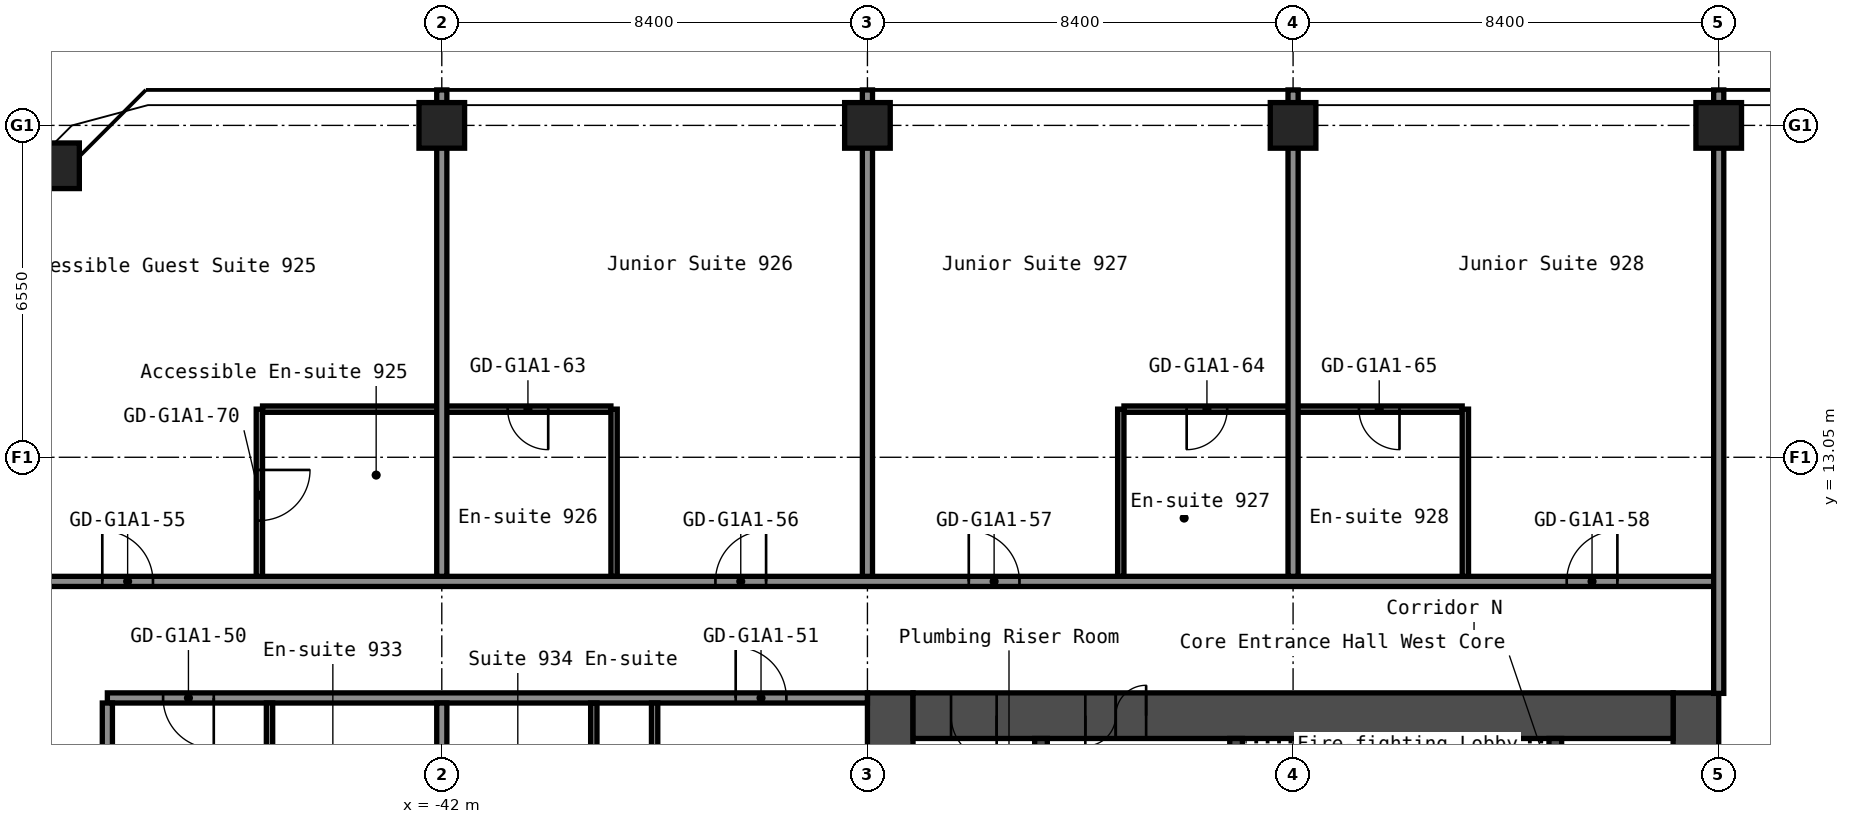
"""IFC4 building model, lengths in metres.
Left out: names, types, materials, properties, quantities, classifications, styles, units other than length and angle.
Written with IfcOpenShell. Run it as: python <this file> out.ifc"""

import sys

from ifc_helpers import new_model, si_unit, direction, frame, frame_2d, origin, origin_2d, place, context, subcontext, project, spatial, rectangle, hollow_rectangle, extrude, element, fill, save


model = new_model("IFC4")
c1 = context("Model", 3, precision=1e-05, world=origin(), true_north=direction((0.0, 1.0)))
c2 = subcontext(c1, "Body", "Model", "MODEL_VIEW")
j1 = project(units=[si_unit("LENGTHUNIT", "METRE"), si_unit("PLANEANGLEUNIT", "RADIAN")], contexts=[c1])
p1 = place(None, origin())
s1 = spatial("IfcSite", under=j1, at=p1, CompositionType="ELEMENT")
p2 = place(p1, origin())
s2 = spatial("IfcBuilding", under=s1, at=p2, CompositionType="ELEMENT")
p3 = place(p2, frame((0.0, 0.0, 35.8)))
s3 = spatial("IfcBuildingStorey", under=s2, at=p3, CompositionType="ELEMENT", Elevation=35.8)
for number, where, z_axis, x_axis in (
    (1, (-49.603, 18.803, 0.0), (0.0, 0.0, 1.0), (1.0, 0.0, 0.0)),
    (2, (-42.0, 19.6, 0.0), (0.0, 0.0, 1.0), (1.0, 0.0, 0.0)),
    (3, (-33.6, 19.6, 0.0), (0.0, 0.0, 1.0), (1.0, 0.0, 0.0)),
    (4, (-25.2, 19.6, 0.0), (0.0, 0.0, 1.0), (1.0, 0.0, 0.0)),
    (5, (-16.8, 19.6, 0.0), (0.0, 0.0, 1.0), (1.0, 0.0, 0.0)),
):
    element("IfcColumn", number, at=place(p3, frame(where, z_axis=z_axis, x_axis=x_axis)), inside=s3, PredefinedType="COLUMN", context=c2, shape_type="SweptSolid", body=[
        extrude(hollow_rectangle(XDim=0.9, YDim=0.9, WallThickness=0.036, at=origin_2d()), origin(), (0.0, 0.0, 1.0), 2.8),
    ])
p4 = place(p3, frame((-17.25, -8.4, 0.0), z_axis=(0.0, 0.0, 1.0), x_axis=(0.0, 1.0, 0.0)))
e6 = element("IfcWall", 6, at=p4, inside=s3, PredefinedType="SHEAR", context=c2, shape_type="SweptSolid", body=[
    extrude(rectangle(XDim=16.8, YDim=0.9, at=frame_2d((8.4, 0.0))), origin(), (0.0, 0.0, 1.0), 2.8),
])
p5 = place(p4, frame((12.75, 0.0, 0.0)))
e7 = element("IfcOpeningElement", 7, at=p5, cuts=e6, PredefinedType="OPENING", context=c2, shape_type="SweptSolid", body=[
    extrude(rectangle(XDim=1.2, YDim=2.1, at=frame_2d((0.6, 1.05))), frame((0.0, 0.46, 0.0), z_axis=(0.0, -1.0, 0.0), x_axis=(1.0, 0.0, 0.0)), (0.0, 0.0, 1.0), 0.92),
])
p6 = place(p4, frame((2.85, 0.0, 0.0)))
e8 = element("IfcOpeningElement", 8, at=p6, cuts=e6, PredefinedType="OPENING", context=c2, shape_type="SweptSolid", body=[
    extrude(rectangle(XDim=1.2, YDim=2.1, at=frame_2d((0.6, 1.05))), frame((0.0, 0.46, 0.0), z_axis=(0.0, -1.0, 0.0), x_axis=(1.0, 0.0, 0.0)), (0.0, 0.0, 1.0), 0.92),
])
p7 = place(p3, frame((-33.15, -8.4, 0.0), z_axis=(0.0, 0.0, 1.0), x_axis=(0.0, 1.0, 0.0)))
e9 = element("IfcWall", 9, at=p7, inside=s3, PredefinedType="SHEAR", context=c2, shape_type="SweptSolid", body=[
    extrude(rectangle(XDim=16.8, YDim=0.9, at=frame_2d((8.4, 0.0))), origin(), (0.0, 0.0, 1.0), 2.8),
])
p8 = place(p3, frame((-32.7, 7.95, 0.0), z_axis=(0.0, 0.0, 1.0), x_axis=(1.0, 0.0, 0.0)))
e10 = element("IfcWall", 10, at=p8, inside=s3, PredefinedType="SHEAR", context=c2, shape_type="SweptSolid", body=[
    extrude(rectangle(XDim=15.0, YDim=0.9, at=frame_2d((7.5, 0.0))), origin(), (0.0, 0.0, 1.0), 2.8),
])
p9 = place(p8, frame((3.4, 0.0, 0.0)))
e11 = element("IfcOpeningElement", 11, at=p9, cuts=e10, PredefinedType="OPENING", context=c2, shape_type="SweptSolid", body=[
    extrude(rectangle(XDim=1.2, YDim=2.1, at=frame_2d((0.6, 1.05))), frame((0.0, 0.46, 0.0), z_axis=(0.0, -1.0, 0.0), x_axis=(1.0, 0.0, 0.0)), (0.0, 0.0, 1.0), 0.92),
])
p10 = place(p8, frame((0.75, 0.0, 0.0)))
e12 = element("IfcOpeningElement", 12, at=p10, cuts=e10, PredefinedType="OPENING", context=c2, shape_type="SweptSolid", body=[
    extrude(rectangle(XDim=0.9, YDim=2.1, at=frame_2d((0.45, 1.05))), frame((0.0, 0.46, 0.0), z_axis=(0.0, -1.0, 0.0), x_axis=(1.0, 0.0, 0.0)), (0.0, 0.0, 1.0), 0.92),
])
p11 = place(p3, frame((-20.025, 1.2, 0.0), z_axis=(0.0, 0.0, 1.0), x_axis=(0.0, 1.0, 0.0)))
e13 = element("IfcWall", 13, at=p11, inside=s3, PredefinedType="SHEAR", context=c2, shape_type="SweptSolid", body=[
    extrude(rectangle(XDim=6.3, YDim=0.25, at=frame_2d((3.15, 0.0))), origin(), (0.0, 0.0, 1.0), 2.8),
])
p12 = place(p3, frame((-26.325, 3.75, 0.0), z_axis=(0.0, 0.0, 1.0), x_axis=(0.0, 1.0, 0.0)))
e14 = element("IfcWall", 14, at=p12, inside=s3, PredefinedType="SHEAR", context=c2, shape_type="SweptSolid", body=[
    extrude(rectangle(XDim=3.75, YDim=0.25, at=frame_2d((1.875, 0.0))), origin(), (0.0, 0.0, 1.0), 2.8),
])
p13 = place(p12, frame((1.25, 0.0, 0.0)))
e15 = element("IfcOpeningElement", 15, at=p13, cuts=e14, PredefinedType="OPENING", context=c2, shape_type="SweptSolid", body=[
    extrude(rectangle(XDim=1.2, YDim=2.1, at=frame_2d((0.6, 1.05))), frame((0.0, 0.135, 0.0), z_axis=(0.0, -1.0, 0.0), x_axis=(1.0, 0.0, 0.0)), (0.0, 0.0, 1.0), 0.27),
])
p14 = place(p3, frame((-30.175, 1.45, 0.0), z_axis=(0.0, 0.0, 1.0), x_axis=(0.0, 1.0, 0.0)))
e16 = element("IfcWall", 16, at=p14, inside=s3, PredefinedType="SHEAR", context=c2, shape_type="SweptSolid", body=[
    extrude(rectangle(XDim=6.05, YDim=0.25, at=frame_2d((3.025, 0.0))), origin(), (0.0, 0.0, 1.0), 2.8),
])
p15 = place(p14, frame((2.625, 0.0, 0.0)))
e17 = element("IfcOpeningElement", 17, at=p15, cuts=e16, PredefinedType="OPENING", context=c2, shape_type="SweptSolid", body=[
    extrude(rectangle(XDim=1.1, YDim=2.1, at=frame_2d((0.55, 1.05))), frame((0.0, 0.135, 0.0), z_axis=(0.0, -1.0, 0.0), x_axis=(1.0, 0.0, 0.0)), (0.0, 0.0, 1.0), 0.27),
])
p16 = place(p3, frame((-48.6, 8.3, 0.0), z_axis=(0.0, 0.0, 1.0), x_axis=(1.0, 0.0, 0.0)))
e18 = element("IfcWall", 18, at=p16, inside=s3, PredefinedType="PARTITIONING", context=c2, shape_type="SweptSolid", body=[
    extrude(rectangle(XDim=15.0, YDim=0.2, at=frame_2d((7.5, 0.0))), origin(), (0.0, 0.0, 1.0), 2.8),
])
p17 = place(p16, frame((1.1, 0.0, 0.0)))
e19 = element("IfcOpeningElement", 19, at=p17, cuts=e18, PredefinedType="OPENING", context=c2, shape_type="SweptSolid", body=[
    extrude(rectangle(XDim=1.0, YDim=2.1, at=frame_2d((0.5, 1.05))), frame((0.0, 0.11, 0.0), z_axis=(0.0, -1.0, 0.0), x_axis=(1.0, 0.0, 0.0)), (0.0, 0.0, 1.0), 0.22),
])
p18 = place(p16, frame((12.4, 0.0, 0.0)))
e20 = element("IfcOpeningElement", 20, at=p18, cuts=e18, PredefinedType="OPENING", context=c2, shape_type="SweptSolid", body=[
    extrude(rectangle(XDim=1.0, YDim=2.1, at=frame_2d((0.5, 1.05))), frame((0.0, 0.11, 0.0), z_axis=(0.0, -1.0, 0.0), x_axis=(1.0, 0.0, 0.0)), (0.0, 0.0, 1.0), 0.22),
])
p19 = place(p3, frame((-51.1, 10.6, 0.0), z_axis=(0.0, 0.0, 1.0), x_axis=(1.0, 0.0, 0.0)))
e21 = element("IfcWall", 21, at=p19, inside=s3, PredefinedType="PARTITIONING", context=c2, shape_type="SweptSolid", body=[
    extrude(rectangle(XDim=34.3, YDim=0.2, at=frame_2d((17.15, 0.0))), origin(), (0.0, 0.0, 1.0), 2.8),
])
p20 = place(p19, frame((2.4, 0.0, 0.0)))
e22 = element("IfcOpeningElement", 22, at=p20, cuts=e21, PredefinedType="OPENING", context=c2, shape_type="SweptSolid", body=[
    extrude(rectangle(XDim=1.0, YDim=2.1, at=frame_2d((0.5, 1.05))), frame((0.0, 0.11, 0.0), z_axis=(0.0, -1.0, 0.0), x_axis=(1.0, 0.0, 0.0)), (0.0, 0.0, 1.0), 0.22),
])
p21 = place(p19, frame((14.5, 0.0, 0.0)))
e23 = element("IfcOpeningElement", 23, at=p21, cuts=e21, PredefinedType="OPENING", context=c2, shape_type="SweptSolid", body=[
    extrude(rectangle(XDim=1.0, YDim=2.1, at=frame_2d((0.5, 1.05))), frame((0.0, 0.11, 0.0), z_axis=(0.0, -1.0, 0.0), x_axis=(1.0, 0.0, 0.0)), (0.0, 0.0, 1.0), 0.22),
])
p22 = place(p19, frame((19.5, 0.0, 0.0)))
e24 = element("IfcOpeningElement", 24, at=p22, cuts=e21, PredefinedType="OPENING", context=c2, shape_type="SweptSolid", body=[
    extrude(rectangle(XDim=1.0, YDim=2.1, at=frame_2d((0.5, 1.05))), frame((0.0, 0.11, 0.0), z_axis=(0.0, -1.0, 0.0), x_axis=(1.0, 0.0, 0.0)), (0.0, 0.0, 1.0), 0.22),
])
p23 = place(p19, frame((31.3, 0.0, 0.0)))
e25 = element("IfcOpeningElement", 25, at=p23, cuts=e21, PredefinedType="OPENING", context=c2, shape_type="SweptSolid", body=[
    extrude(rectangle(XDim=1.0, YDim=2.1, at=frame_2d((0.5, 1.05))), frame((0.0, 0.11, 0.0), z_axis=(0.0, -1.0, 0.0), x_axis=(1.0, 0.0, 0.0)), (0.0, 0.0, 1.0), 0.22),
])
p24 = place(p3, frame((-45.538, 14.0, 0.0), z_axis=(0.0, 0.0, 1.0), x_axis=(1.0, 0.0, 0.0)))
e26 = element("IfcWall", 26, at=p24, inside=s3, PredefinedType="PARTITIONING", context=c2, shape_type="SweptSolid", body=[
    extrude(rectangle(XDim=6.875, YDim=0.125, at=frame_2d((3.438, 0.0))), origin(), (0.0, 0.0, 1.0), 2.8),
])
p25 = place(p24, frame((4.837, 0.0, 0.0)))
e27 = element("IfcOpeningElement", 27, at=p25, cuts=e26, PredefinedType="OPENING", context=c2, shape_type="SweptSolid", body=[
    extrude(rectangle(XDim=0.8, YDim=2.1, at=frame_2d((0.4, 1.05))), frame((0.0, 0.073, 0.0), z_axis=(0.0, -1.0, 0.0), x_axis=(1.0, 0.0, 0.0)), (0.0, 0.0, 1.0), 0.145),
])
p26 = place(p3, frame((-28.538, 14.0, 0.0), z_axis=(0.0, 0.0, 1.0), x_axis=(1.0, 0.0, 0.0)))
e28 = element("IfcWall", 28, at=p26, inside=s3, PredefinedType="PARTITIONING", context=c2, shape_type="SweptSolid", body=[
    extrude(rectangle(XDim=6.675, YDim=0.125, at=frame_2d((3.337, 0.0))), origin(), (0.0, 0.0, 1.0), 2.8),
])
p27 = place(p26, frame((1.238, 0.0, 0.0)))
e29 = element("IfcOpeningElement", 29, at=p27, cuts=e28, PredefinedType="OPENING", context=c2, shape_type="SweptSolid", body=[
    extrude(rectangle(XDim=0.8, YDim=2.1, at=frame_2d((0.4, 1.05))), frame((0.0, 0.073, 0.0), z_axis=(0.0, -1.0, 0.0), x_axis=(1.0, 0.0, 0.0)), (0.0, 0.0, 1.0), 0.145),
])
p28 = place(p26, frame((4.637, 0.0, 0.0)))
e30 = element("IfcOpeningElement", 30, at=p28, cuts=e28, PredefinedType="OPENING", context=c2, shape_type="SweptSolid", body=[
    extrude(rectangle(XDim=0.8, YDim=2.1, at=frame_2d((0.4, 1.05))), frame((0.0, 0.073, 0.0), z_axis=(0.0, -1.0, 0.0), x_axis=(1.0, 0.0, 0.0)), (0.0, 0.0, 1.0), 0.145),
])
p29 = place(p3, frame((-48.6, -8.2, 0.0), z_axis=(0.0, 0.0, 1.0), x_axis=(0.0, 1.0, 0.0)))
e31 = element("IfcWall", 31, at=p29, inside=s3, PredefinedType="PARTITIONING", context=c2, shape_type="SweptSolid", body=[
    extrude(rectangle(XDim=16.4, YDim=0.2, at=frame_2d((8.2, 0.0))), origin(), (0.0, 0.0, 1.0), 2.8),
])
p30 = place(p3, frame((-45.6, 10.7, 0.0), z_axis=(0.0, 0.0, 1.0), x_axis=(0.0, 1.0, 0.0)))
e32 = element("IfcWall", 32, at=p30, inside=s3, PredefinedType="PARTITIONING", context=c2, shape_type="SweptSolid", body=[
    extrude(rectangle(XDim=3.3, YDim=0.125, at=frame_2d((1.65, 0.0))), origin(), (0.0, 0.0, 1.0), 2.8),
])
p31 = place(p30, frame((1.1, 0.0, 0.0)))
e33 = element("IfcOpeningElement", 33, at=p31, cuts=e32, PredefinedType="OPENING", context=c2, shape_type="SweptSolid", body=[
    extrude(rectangle(XDim=1.0, YDim=2.1, at=frame_2d((0.5, 1.05))), frame((0.0, 0.073, 0.0), z_axis=(0.0, -1.0, 0.0), x_axis=(1.0, 0.0, 0.0)), (0.0, 0.0, 1.0), 0.145),
])
p32 = place(p3, frame((-45.4, 4.9, 0.0), z_axis=(0.0, 0.0, 1.0), x_axis=(0.0, 1.0, 0.0)))
e34 = element("IfcWall", 34, at=p32, inside=s3, PredefinedType="PARTITIONING", context=c2, shape_type="SweptSolid", body=[
    extrude(rectangle(XDim=3.3, YDim=0.125, at=frame_2d((1.65, 0.0))), origin(), (0.0, 0.0, 1.0), 2.8),
])
p33 = place(p3, frame((-42.0, -8.2, 0.0), z_axis=(0.0, 0.0, 1.0), x_axis=(0.0, 1.0, 0.0)))
e35 = element("IfcWall", 35, at=p33, inside=s3, PredefinedType="PARTITIONING", context=c2, shape_type="SweptSolid", body=[
    extrude(rectangle(XDim=16.4, YDim=0.2, at=frame_2d((8.2, 0.0))), origin(), (0.0, 0.0, 1.0), 2.8),
])
p34 = place(p3, frame((-42.0, 10.7, 0.0), z_axis=(0.0, 0.0, 1.0), x_axis=(0.0, 1.0, 0.0)))
e36 = element("IfcWall", 36, at=p34, inside=s3, PredefinedType="PARTITIONING", context=c2, shape_type="SweptSolid", body=[
    extrude(rectangle(XDim=9.6, YDim=0.2, at=frame_2d((4.8, 0.0))), origin(), (0.0, 0.0, 1.0), 2.8),
])
p35 = place(p3, frame((-39.0, 5.1, 0.0), z_axis=(0.0, 0.0, 1.0), x_axis=(0.0, 1.0, 0.0)))
e37 = element("IfcWall", 37, at=p35, inside=s3, PredefinedType="PARTITIONING", context=c2, shape_type="SweptSolid", body=[
    extrude(rectangle(XDim=3.1, YDim=0.125, at=frame_2d((1.55, 0.0))), origin(), (0.0, 0.0, 1.0), 2.8),
])
p36 = place(p3, frame((-38.6, 10.7, 0.0), z_axis=(0.0, 0.0, 1.0), x_axis=(0.0, 1.0, 0.0)))
e38 = element("IfcWall", 38, at=p36, inside=s3, PredefinedType="PARTITIONING", context=c2, shape_type="SweptSolid", body=[
    extrude(rectangle(XDim=3.3, YDim=0.125, at=frame_2d((1.65, 0.0))), origin(), (0.0, 0.0, 1.0), 2.8),
])
p37 = place(p3, frame((-37.8, 0.1, 0.0), z_axis=(0.0, 0.0, 1.0), x_axis=(0.0, 1.0, 0.0)))
e39 = element("IfcWall", 39, at=p37, inside=s3, PredefinedType="PARTITIONING", context=c2, shape_type="SweptSolid", body=[
    extrude(rectangle(XDim=8.1, YDim=0.125, at=frame_2d((4.05, 0.0))), origin(), (0.0, 0.0, 1.0), 2.8),
])
p38 = place(p37, frame((3.15, 0.0, 0.0)))
e40 = element("IfcOpeningElement", 40, at=p38, cuts=e39, PredefinedType="OPENING", context=c2, shape_type="SweptSolid", body=[
    extrude(rectangle(XDim=0.9, YDim=2.1, at=frame_2d((0.45, 1.05))), frame((0.0, 0.073, 0.0), z_axis=(0.0, -1.0, 0.0), x_axis=(1.0, 0.0, 0.0)), (0.0, 0.0, 1.0), 0.145),
])
p39 = place(p3, frame((-33.6, 10.7, 0.0), z_axis=(0.0, 0.0, 1.0), x_axis=(0.0, 1.0, 0.0)))
e41 = element("IfcWall", 41, at=p39, inside=s3, PredefinedType="PARTITIONING", context=c2, shape_type="SweptSolid", body=[
    extrude(rectangle(XDim=9.6, YDim=0.2, at=frame_2d((4.8, 0.0))), origin(), (0.0, 0.0, 1.0), 2.8),
])
p40 = place(p3, frame((-28.6, 10.7, 0.0), z_axis=(0.0, 0.0, 1.0), x_axis=(0.0, 1.0, 0.0)))
e42 = element("IfcWall", 42, at=p40, inside=s3, PredefinedType="PARTITIONING", context=c2, shape_type="SweptSolid", body=[
    extrude(rectangle(XDim=3.3, YDim=0.125, at=frame_2d((1.65, 0.0))), origin(), (0.0, 0.0, 1.0), 2.8),
])
p41 = place(p3, frame((-25.2, 10.7, 0.0), z_axis=(0.0, 0.0, 1.0), x_axis=(0.0, 1.0, 0.0)))
e43 = element("IfcWall", 43, at=p41, inside=s3, PredefinedType="PARTITIONING", context=c2, shape_type="SweptSolid", body=[
    extrude(rectangle(XDim=9.6, YDim=0.2, at=frame_2d((4.8, 0.0))), origin(), (0.0, 0.0, 1.0), 2.8),
])
p42 = place(p3, frame((-21.8, 10.7, 0.0), z_axis=(0.0, 0.0, 1.0), x_axis=(0.0, 1.0, 0.0)))
e44 = element("IfcWall", 44, at=p42, inside=s3, PredefinedType="PARTITIONING", context=c2, shape_type="SweptSolid", body=[
    extrude(rectangle(XDim=3.3, YDim=0.125, at=frame_2d((1.65, 0.0))), origin(), (0.0, 0.0, 1.0), 2.8),
])
p43 = place(p3, frame((-16.8, 8.39, 0.0), z_axis=(0.0, 0.0, 1.0), x_axis=(0.0, 1.0, 0.0)))
e45 = element("IfcWall", 45, at=p43, inside=s3, PredefinedType="PARTITIONING", context=c2, shape_type="SweptSolid", body=[
    extrude(rectangle(XDim=11.91, YDim=0.2, at=frame_2d((5.955, 0.0))), origin(), (0.0, 0.0, 1.0), 2.8),
])
p44 = place(p9, origin())
e46 = element("IfcDoor", 46, at=p44, inside=s3, OperationType="DOUBLE_DOOR_SINGLE_SWING", PredefinedType="DOOR", context=c2, shape_type="SweptSolid", body=[
    extrude(rectangle(XDim=1.2, YDim=2.1, at=frame_2d((0.6, 1.05))), frame((0.0, 0.025, 0.0), z_axis=(0.0, -1.0, 0.0), x_axis=(1.0, 0.0, 0.0)), (0.0, 0.0, 1.0), 0.05),
])
fill(e11, e46)
p45 = place(p10, origin())
e47 = element("IfcDoor", 47, at=p45, inside=s3, OperationType="SINGLE_SWING_RIGHT", PredefinedType="DOOR", context=c2, shape_type="SweptSolid", body=[
    extrude(rectangle(XDim=0.9, YDim=2.1, at=frame_2d((0.45, 1.05))), frame((0.0, 0.025, 0.0), z_axis=(0.0, -1.0, 0.0), x_axis=(1.0, 0.0, 0.0)), (0.0, 0.0, 1.0), 0.05),
])
fill(e12, e47)
p46 = place(p17, origin())
e48 = element("IfcDoor", 48, at=p46, inside=s3, OperationType="SINGLE_SWING_RIGHT", PredefinedType="DOOR", context=c2, shape_type="SweptSolid", body=[
    extrude(rectangle(XDim=1.0, YDim=2.1, at=frame_2d((0.5, 1.05))), frame((0.0, 0.025, 0.0), z_axis=(0.0, -1.0, 0.0), x_axis=(1.0, 0.0, 0.0)), (0.0, 0.0, 1.0), 0.05),
])
fill(e19, e48)
p47 = place(p18, origin())
e49 = element("IfcDoor", 49, at=p47, inside=s3, OperationType="SINGLE_SWING_RIGHT", PredefinedType="DOOR", context=c2, shape_type="SweptSolid", body=[
    extrude(rectangle(XDim=1.0, YDim=2.1, at=frame_2d((0.5, 1.05))), frame((0.0, 0.025, 0.0), z_axis=(0.0, -1.0, 0.0), x_axis=(1.0, 0.0, 0.0)), (0.0, 0.0, 1.0), 0.05),
])
fill(e20, e49)
p48 = place(p20, origin())
e50 = element("IfcDoor", 50, at=p48, inside=s3, OperationType="SINGLE_SWING_RIGHT", PredefinedType="DOOR", context=c2, shape_type="SweptSolid", body=[
    extrude(rectangle(XDim=1.0, YDim=2.1, at=frame_2d((0.5, 1.05))), frame((0.0, 0.025, 0.0), z_axis=(0.0, -1.0, 0.0), x_axis=(1.0, 0.0, 0.0)), (0.0, 0.0, 1.0), 0.05),
])
fill(e22, e50)
p49 = place(p21, origin())
e51 = element("IfcDoor", 51, at=p49, inside=s3, OperationType="SINGLE_SWING_LEFT", PredefinedType="DOOR", context=c2, shape_type="SweptSolid", body=[
    extrude(rectangle(XDim=1.0, YDim=2.1, at=frame_2d((0.5, 1.05))), frame((0.0, 0.025, 0.0), z_axis=(0.0, -1.0, 0.0), x_axis=(1.0, 0.0, 0.0)), (0.0, 0.0, 1.0), 0.05),
])
fill(e23, e51)
p50 = place(p22, origin())
e52 = element("IfcDoor", 52, at=p50, inside=s3, OperationType="SINGLE_SWING_RIGHT", PredefinedType="DOOR", context=c2, shape_type="SweptSolid", body=[
    extrude(rectangle(XDim=1.0, YDim=2.1, at=frame_2d((0.5, 1.05))), frame((0.0, 0.025, 0.0), z_axis=(0.0, -1.0, 0.0), x_axis=(1.0, 0.0, 0.0)), (0.0, 0.0, 1.0), 0.05),
])
fill(e24, e52)
p51 = place(p23, origin())
e53 = element("IfcDoor", 53, at=p51, inside=s3, OperationType="SINGLE_SWING_LEFT", PredefinedType="DOOR", context=c2, shape_type="SweptSolid", body=[
    extrude(rectangle(XDim=1.0, YDim=2.1, at=frame_2d((0.5, 1.05))), frame((0.0, 0.025, 0.0), z_axis=(0.0, -1.0, 0.0), x_axis=(1.0, 0.0, 0.0)), (0.0, 0.0, 1.0), 0.05),
])
fill(e25, e53)
p52 = place(p25, origin())
e54 = element("IfcDoor", 54, at=p52, inside=s3, OperationType="SINGLE_SWING_RIGHT", PredefinedType="DOOR", context=c2, shape_type="SweptSolid", body=[
    extrude(rectangle(XDim=0.8, YDim=2.1, at=frame_2d((0.4, 1.05))), frame((0.0, 0.025, 0.0), z_axis=(0.0, -1.0, 0.0), x_axis=(1.0, 0.0, 0.0)), (0.0, 0.0, 1.0), 0.05),
])
fill(e27, e54)
p53 = place(p27, origin())
e55 = element("IfcDoor", 55, at=p53, inside=s3, OperationType="SINGLE_SWING_LEFT", PredefinedType="DOOR", context=c2, shape_type="SweptSolid", body=[
    extrude(rectangle(XDim=0.8, YDim=2.1, at=frame_2d((0.4, 1.05))), frame((0.0, 0.025, 0.0), z_axis=(0.0, -1.0, 0.0), x_axis=(1.0, 0.0, 0.0)), (0.0, 0.0, 1.0), 0.05),
])
fill(e29, e55)
p54 = place(p28, origin())
e56 = element("IfcDoor", 56, at=p54, inside=s3, OperationType="SINGLE_SWING_RIGHT", PredefinedType="DOOR", context=c2, shape_type="SweptSolid", body=[
    extrude(rectangle(XDim=0.8, YDim=2.1, at=frame_2d((0.4, 1.05))), frame((0.0, 0.025, 0.0), z_axis=(0.0, -1.0, 0.0), x_axis=(1.0, 0.0, 0.0)), (0.0, 0.0, 1.0), 0.05),
])
fill(e30, e56)
p55 = place(p31, origin())
e57 = element("IfcDoor", 57, at=p55, inside=s3, OperationType="SINGLE_SWING_RIGHT", PredefinedType="DOOR", context=c2, shape_type="SweptSolid", body=[
    extrude(rectangle(XDim=1.0, YDim=2.1, at=frame_2d((0.5, 1.05))), frame((0.0, 0.025, 0.0), z_axis=(0.0, -1.0, 0.0), x_axis=(1.0, 0.0, 0.0)), (0.0, 0.0, 1.0), 0.05),
])
fill(e33, e57)
save(model, sys.argv[1])
